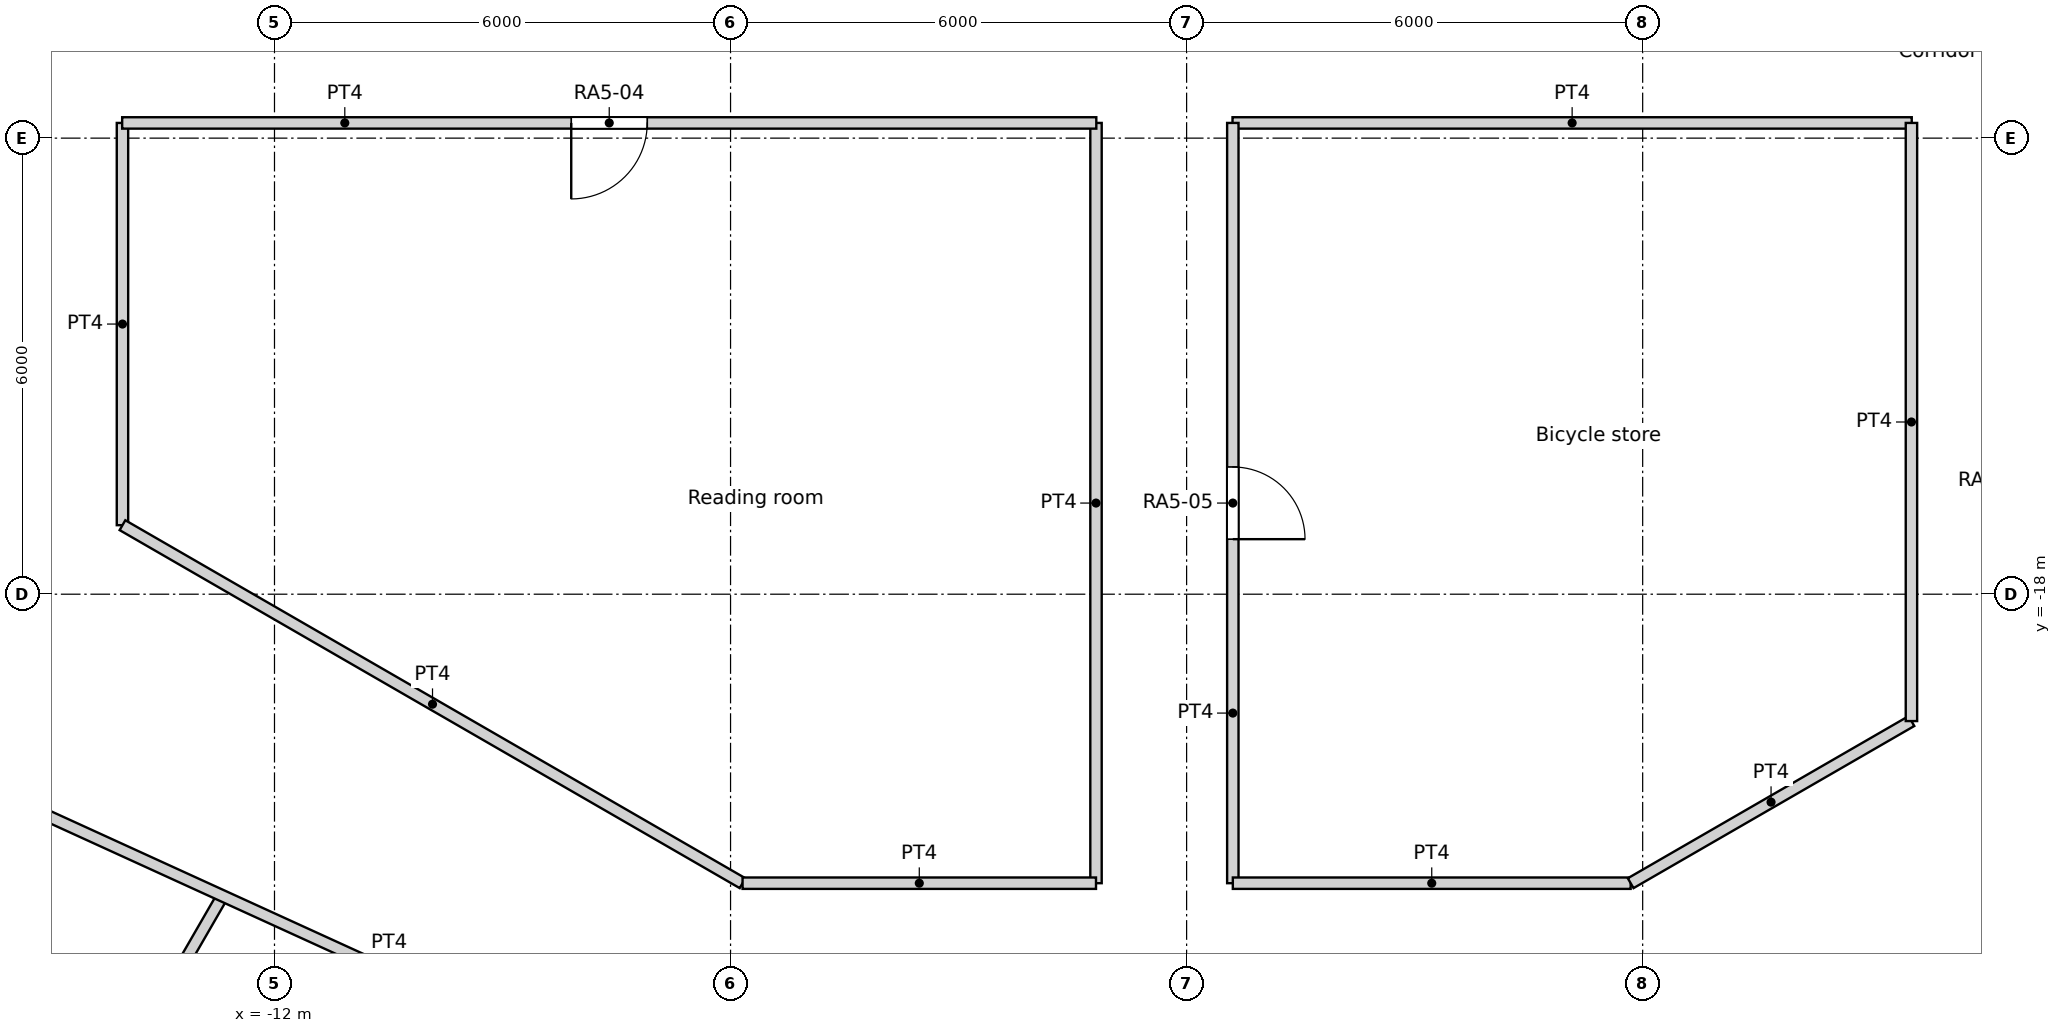
"""IFC4 building model, lengths in metres.
Left out: names, types, materials, properties, quantities, classifications, styles, units other than length and angle.
Written with IfcOpenShell. Run it as: python <this file> out.ifc"""

import sys

from ifc_helpers import new_model, si_unit, direction, frame, frame_2d, origin, origin_2d, place, context, subcontext, project, spatial, rectangle, circle, extrude, element, fill, save


model = new_model("IFC4")
c1 = context("Model", 3, precision=1e-05, world=origin(), true_north=direction((0.0, 1.0)))
c2 = subcontext(c1, "Body", "Model", "MODEL_VIEW")
j1 = project(units=[si_unit("LENGTHUNIT", "METRE"), si_unit("PLANEANGLEUNIT", "RADIAN")], contexts=[c1])
p1 = place(None, origin())
s1 = spatial("IfcSite", under=j1, at=p1, CompositionType="ELEMENT")
p2 = place(p1, origin())
s2 = spatial("IfcBuilding", under=s1, at=p2, CompositionType="ELEMENT")
p3 = place(p2, frame((0.0, 0.0, 71.4)))
s3 = spatial("IfcBuildingStorey", under=s2, at=p3, CompositionType="ELEMENT", Elevation=71.4)
for number, where, z_axis, x_axis in (
    (1, (-12.274, -21.259, 0.0), (0.0, 0.0, 1.0), (1.0, 0.0, 0.0)),
    (2, (9.723, -22.54, 0.0), (0.0, 0.0, 1.0), (1.0, 0.0, 0.0)),
):
    element("IfcColumn", number, at=place(p3, frame(where, z_axis=z_axis, x_axis=x_axis)), inside=s3, PredefinedType="COLUMN", context=c2, shape_type="SweptSolid", body=[
        extrude(circle(Radius=0.65, at=origin_2d()), origin(), (0.0, 0.0, 1.0), 3.6),
    ])
for number, where, z_axis, x_axis in (
    (3, (-13.798, -12.802, 0.0), (0.0, 0.0, 1.0), (1.0, 0.0, 0.0)),
    (4, (-9.411, -16.301, 0.0), (0.0, 0.0, 1.0), (1.0, 0.0, 0.0)),
    (5, (-4.188, -18.35, 0.0), (0.0, 0.0, 1.0), (1.0, 0.0, 0.0)),
    (6, (1.406, -18.77, 0.0), (0.0, 0.0, 1.0), (1.0, 0.0, 0.0)),
    (7, (6.876, -17.521, 0.0), (0.0, 0.0, 1.0), (1.0, 0.0, 0.0)),
):
    element("IfcColumn", number, at=place(p3, frame(where, z_axis=z_axis, x_axis=x_axis)), inside=s3, PredefinedType="COLUMN", context=c2, shape_type="SweptSolid", body=[
        extrude(circle(Radius=0.7, at=origin_2d()), origin(), (0.0, 0.0, 1.0), 3.6),
    ])
p4 = place(p3, frame((-14.004, -11.8, 0.0), z_axis=(0.0, 0.0, 1.0), x_axis=(1.0, 0.0, 0.0)))
e8 = element("IfcWall", 8, at=p4, inside=s3, PredefinedType="PARTITIONING", context=c2, shape_type="SweptSolid", body=[
    extrude(rectangle(XDim=12.816, YDim=0.15, at=frame_2d((6.408, 0.0))), origin(), (0.0, 0.0, 1.0), 3.15),
])
p5 = place(p4, frame((5.908, 0.0, 0.0)))
e9 = element("IfcOpeningElement", 9, at=p5, cuts=e8, PredefinedType="OPENING", context=c2, shape_type="SweptSolid", body=[
    extrude(rectangle(XDim=1.0, YDim=2.04, at=frame_2d((0.5, 1.02))), frame((0.0, 0.075, 0.0), z_axis=(0.0, -1.0, 0.0), x_axis=(1.0, 0.0, 0.0)), (0.0, 0.0, 1.0), 0.15),
])
p6 = place(p3, frame((0.604, -11.8, 0.0), z_axis=(0.0, 0.0, 1.0), x_axis=(1.0, 0.0, 0.0)))
e10 = element("IfcWall", 10, at=p6, inside=s3, PredefinedType="PARTITIONING", context=c2, shape_type="SweptSolid", body=[
    extrude(rectangle(XDim=8.936, YDim=0.15, at=frame_2d((4.468, 0.0))), origin(), (0.0, 0.0, 1.0), 3.15),
])
p7 = place(p3, frame((-14.0, -17.092, 0.0), z_axis=(0.0, 0.0, 1.0), x_axis=(0.0, 1.0, 0.0)))
e11 = element("IfcWall", 11, at=p7, inside=s3, PredefinedType="PARTITIONING", context=c2, shape_type="SweptSolid", body=[
    extrude(rectangle(XDim=5.292, YDim=0.15, at=frame_2d((2.646, 0.0))), origin(), (0.0, 0.0, 1.0), 3.15),
])
p8 = place(p3, frame((-14.0, -17.092, 0.0), z_axis=(0.0, 0.0, 1.0), x_axis=(0.86602719091, -0.499996904595, 0.0)))
e12 = element("IfcWall", 12, at=p8, inside=s3, PredefinedType="PARTITIONING", context=c2, shape_type="SweptSolid", body=[
    extrude(rectangle(XDim=9.42, YDim=0.15, at=frame_2d((4.71, 0.0))), origin(), (0.0, 0.0, 1.0), 3.15),
])
p9 = place(p3, frame((-5.842, -21.802, 0.0), z_axis=(0.0, 0.0, 1.0), x_axis=(1.0, 0.0, 0.0)))
e13 = element("IfcWall", 13, at=p9, inside=s3, PredefinedType="PARTITIONING", context=c2, shape_type="SweptSolid", body=[
    extrude(rectangle(XDim=4.65, YDim=0.15, at=frame_2d((2.325, 0.0))), origin(), (0.0, 0.0, 1.0), 3.15),
])
p10 = place(p3, frame((-1.192, -21.802, 0.0), z_axis=(0.0, 0.0, 1.0), x_axis=(0.0, 1.0, 0.0)))
e14 = element("IfcWall", 14, at=p10, inside=s3, PredefinedType="PARTITIONING", context=c2, shape_type="SweptSolid", body=[
    extrude(rectangle(XDim=10.002, YDim=0.15, at=frame_2d((5.001, 0.0))), origin(), (0.0, 0.0, 1.0), 3.15),
])
p11 = place(p3, frame((0.608, -21.802, 0.0), z_axis=(0.0, 0.0, 1.0), x_axis=(0.0, 1.0, 0.0)))
e15 = element("IfcWall", 15, at=p11, inside=s3, PredefinedType="PARTITIONING", context=c2, shape_type="SweptSolid", body=[
    extrude(rectangle(XDim=10.002, YDim=0.15, at=frame_2d((5.001, 0.0))), origin(), (0.0, 0.0, 1.0), 3.15),
])
p12 = place(p11, frame((4.526, 0.0, 0.0)))
e16 = element("IfcOpeningElement", 16, at=p12, cuts=e15, PredefinedType="OPENING", context=c2, shape_type="SweptSolid", body=[
    extrude(rectangle(XDim=0.95, YDim=2.1, at=frame_2d((0.475, 1.05))), frame((0.0, 0.075, 0.0), z_axis=(0.0, -1.0, 0.0), x_axis=(1.0, 0.0, 0.0)), (0.0, 0.0, 1.0), 0.15),
])
p13 = place(p3, frame((0.608, -21.802, 0.0), z_axis=(0.0, 0.0, 1.0), x_axis=(1.0, 0.0, 0.0)))
e17 = element("IfcWall", 17, at=p13, inside=s3, PredefinedType="PARTITIONING", context=c2, shape_type="SweptSolid", body=[
    extrude(rectangle(XDim=5.234, YDim=0.15, at=frame_2d((2.617, 0.0))), origin(), (0.0, 0.0, 1.0), 3.15),
])
p14 = place(p3, frame((5.842, -21.802, 0.0), z_axis=(0.0, 0.0, 1.0), x_axis=(0.865983505205, 0.500072563448, 0.0)))
e18 = element("IfcWall", 18, at=p14, inside=s3, PredefinedType="PARTITIONING", context=c2, shape_type="SweptSolid", body=[
    extrude(rectangle(XDim=4.265, YDim=0.15, at=frame_2d((2.133, 0.0))), origin(), (0.0, 0.0, 1.0), 3.15),
])
p15 = place(p3, frame((9.536, -19.669, 0.0), z_axis=(0.0, 0.0, 1.0), x_axis=(0.0, 1.0, 0.0)))
e19 = element("IfcWall", 19, at=p15, inside=s3, PredefinedType="PARTITIONING", context=c2, shape_type="SweptSolid", body=[
    extrude(rectangle(XDim=7.869, YDim=0.15, at=frame_2d((3.935, 0.0))), origin(), (0.0, 0.0, 1.0), 3.15),
])
p16 = place(p3, frame((-17.235, -19.89, 0.0), z_axis=(0.0, 0.0, 1.0), x_axis=(0.909645678785, -0.415385049163, 0.0)))
e20 = element("IfcWall", 20, at=p16, inside=s3, PredefinedType="PARTITIONING", context=c2, shape_type="SweptSolid", body=[
    extrude(rectangle(XDim=14.829, YDim=0.15, at=frame_2d((7.415, 0.0))), origin(), (0.0, 0.0, 1.0), 3.15),
])
p17 = place(p3, frame((-15.612, -27.041, 0.0), z_axis=(0.0, 0.0, 1.0), x_axis=(0.499954606878, 0.86605160993, 0.0)))
e21 = element("IfcWall", 21, at=p17, inside=s3, PredefinedType="PARTITIONING", context=c2, shape_type="SweptSolid", body=[
    extrude(rectangle(XDim=5.856, YDim=0.15, at=frame_2d((2.928, 0.0))), origin(), (0.0, 0.0, 1.0), 3.15),
])
p18 = place(p5, origin())
e22 = element("IfcDoor", 22, at=p18, inside=s3, OperationType="SINGLE_SWING_RIGHT", PredefinedType="DOOR", context=c2, shape_type="SweptSolid", body=[
    extrude(rectangle(XDim=1.0, YDim=2.04, at=frame_2d((0.5, 1.02))), frame((0.0, 0.025, 0.0), z_axis=(0.0, -1.0, 0.0), x_axis=(1.0, 0.0, 0.0)), (0.0, 0.0, 1.0), 0.05),
])
fill(e9, e22)
p19 = place(p12, origin())
e23 = element("IfcDoor", 23, at=p19, inside=s3, OperationType="SINGLE_SWING_RIGHT", PredefinedType="DOOR", context=c2, shape_type="SweptSolid", body=[
    extrude(rectangle(XDim=0.95, YDim=2.1, at=frame_2d((0.475, 1.05))), frame((0.0, 0.025, 0.0), z_axis=(0.0, -1.0, 0.0), x_axis=(1.0, 0.0, 0.0)), (0.0, 0.0, 1.0), 0.05),
])
fill(e16, e23)
save(model, sys.argv[1])
